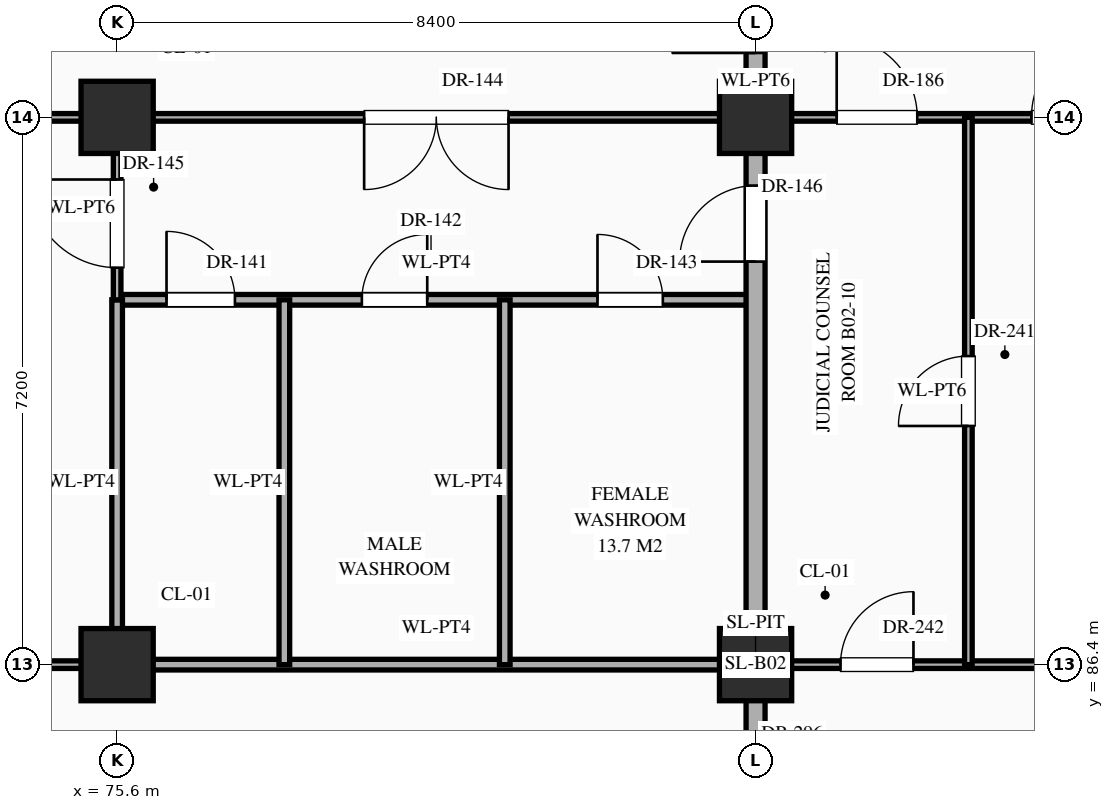
"""IFC4 building model, lengths in metres.
Left out: names, types, materials, properties, quantities, classifications, styles, units other than length and angle.
Written with IfcOpenShell. Run it as: python <this file> out.ifc"""

import sys

from ifc_helpers import new_model, si_unit, direction, frame, frame_2d, origin, origin_2d, place, context, subcontext, project, spatial, rectangle, extrude, element, fill, save


model = new_model("IFC4")
c1 = context("Model", 3, precision=1e-05, world=origin(), true_north=direction((0.0, 1.0)))
c2 = subcontext(c1, "Body", "Model", "MODEL_VIEW")
j1 = project(units=[si_unit("LENGTHUNIT", "METRE"), si_unit("PLANEANGLEUNIT", "RADIAN")], contexts=[c1])
p1 = place(None, origin())
s1 = spatial("IfcSite", under=j1, at=p1, CompositionType="ELEMENT")
p2 = place(p1, origin())
s2 = spatial("IfcBuilding", under=s1, at=p2, CompositionType="ELEMENT")
p3 = place(p2, frame((0.0, 0.0, -10.2)))
s3 = spatial("IfcBuildingStorey", under=s2, at=p3, CompositionType="ELEMENT", Elevation=-10.2)
for number, where, z_axis, x_axis in (
    (1, (75.6, 86.4, 0.0), (0.0, 0.0, 1.0), (1.0, 0.0, 0.0)),
    (2, (75.6, 93.6, 0.0), (0.0, 0.0, 1.0), (1.0, 0.0, 0.0)),
    (3, (84.0, 86.4, 0.0), (0.0, 0.0, 1.0), (1.0, 0.0, 0.0)),
    (4, (84.0, 93.6, 0.0), (0.0, 0.0, 1.0), (1.0, 0.0, 0.0)),
):
    element("IfcColumn", number, at=place(p3, frame(where, z_axis=z_axis, x_axis=x_axis)), inside=s3, PredefinedType="COLUMN", context=c2, shape_type="SweptSolid", body=[
        extrude(rectangle(XDim=0.95, YDim=0.95, at=origin_2d()), origin(), (0.0, 0.0, 1.0), 4.8),
    ])
p4 = place(p3, frame((67.2, 86.4, 0.0), z_axis=(0.0, 0.0, 1.0), x_axis=(1.0, 0.0, 0.0)))
e5 = element("IfcWall", 5, at=p4, inside=s3, PredefinedType="STANDARD", context=c2, shape_type="SweptSolid", body=[
    extrude(rectangle(XDim=8.4, YDim=0.1, at=frame_2d((4.2, 0.0))), origin(), (0.0, 0.0, 1.0), 3.63),
])
p5 = place(p4, frame((3.77, 0.0, 0.0)))
e6 = element("IfcOpeningElement", 6, at=p5, cuts=e5, PredefinedType="OPENING", context=c2, shape_type="SweptSolid", body=[
    extrude(rectangle(XDim=0.86, YDim=2.1, at=frame_2d((0.43, 1.05))), frame((0.0, 0.062, 0.0), z_axis=(0.0, -1.0, 0.0), x_axis=(1.0, 0.0, 0.0)), (0.0, 0.0, 1.0), 0.124),
])
p6 = place(p3, frame((75.6, 86.4, 0.0), z_axis=(0.0, 0.0, 1.0), x_axis=(1.0, 0.0, 0.0)))
e7 = element("IfcWall", 7, at=p6, inside=s3, PredefinedType="STANDARD", context=c2, shape_type="SweptSolid", body=[
    extrude(rectangle(XDim=8.4, YDim=0.14, at=frame_2d((4.2, 0.0))), origin(), (0.0, 0.0, 1.0), 3.63),
])
p7 = place(p3, frame((84.0, 86.4, 0.0), z_axis=(0.0, 0.0, 1.0), x_axis=(1.0, 0.0, 0.0)))
e8 = element("IfcWall", 8, at=p7, inside=s3, PredefinedType="STANDARD", context=c2, shape_type="SweptSolid", body=[
    extrude(rectangle(XDim=16.8, YDim=0.1, at=frame_2d((8.4, 0.0))), origin(), (0.0, 0.0, 1.0), 3.63),
])
p8 = place(p7, frame((1.117, 0.0, 0.0)))
e9 = element("IfcOpeningElement", 9, at=p8, cuts=e8, PredefinedType="OPENING", context=c2, shape_type="SweptSolid", body=[
    extrude(rectangle(XDim=0.96, YDim=2.2, at=frame_2d((0.48, 1.1))), frame((0.0, 0.062, 0.0), z_axis=(0.0, -1.0, 0.0), x_axis=(1.0, 0.0, 0.0)), (0.0, 0.0, 1.0), 0.124),
])
p9 = place(p7, frame((3.68, 0.0, 0.0)))
e10 = element("IfcOpeningElement", 10, at=p9, cuts=e8, PredefinedType="OPENING", context=c2, shape_type="SweptSolid", body=[
    extrude(rectangle(XDim=1.04, YDim=2.2, at=frame_2d((0.52, 1.1))), frame((0.0, 0.062, 0.0), z_axis=(0.0, -1.0, 0.0), x_axis=(1.0, 0.0, 0.0)), (0.0, 0.0, 1.0), 0.124),
])
p10 = place(p7, frame((6.262, 0.0, 0.0)))
e11 = element("IfcOpeningElement", 11, at=p10, cuts=e8, PredefinedType="OPENING", context=c2, shape_type="SweptSolid", body=[
    extrude(rectangle(XDim=1.08, YDim=2.25, at=frame_2d((0.54, 1.125))), frame((0.0, 0.062, 0.0), z_axis=(0.0, -1.0, 0.0), x_axis=(1.0, 0.0, 0.0)), (0.0, 0.0, 1.0), 0.124),
])
p11 = place(p7, frame((12.04, 0.0, 0.0)))
e12 = element("IfcOpeningElement", 12, at=p11, cuts=e8, PredefinedType="OPENING", context=c2, shape_type="SweptSolid", body=[
    extrude(rectangle(XDim=1.12, YDim=2.25, at=frame_2d((0.56, 1.125))), frame((0.0, 0.062, 0.0), z_axis=(0.0, -1.0, 0.0), x_axis=(1.0, 0.0, 0.0)), (0.0, 0.0, 1.0), 0.124),
])
p12 = place(p3, frame((75.6, 91.2, 0.0), z_axis=(0.0, 0.0, 1.0), x_axis=(1.0, 0.0, 0.0)))
e13 = element("IfcWall", 13, at=p12, inside=s3, PredefinedType="STANDARD", context=c2, shape_type="SweptSolid", body=[
    extrude(rectangle(XDim=8.4, YDim=0.14, at=frame_2d((4.2, 0.0))), origin(), (0.0, 0.0, 1.0), 4.48),
])
p13 = place(p12, frame((0.65, 0.0, 0.0)))
e14 = element("IfcOpeningElement", 14, at=p13, cuts=e13, PredefinedType="OPENING", context=c2, shape_type="SweptSolid", body=[
    extrude(rectangle(XDim=0.9, YDim=2.15, at=frame_2d((0.45, 1.075))), frame((0.0, 0.082, 0.0), z_axis=(0.0, -1.0, 0.0), x_axis=(1.0, 0.0, 0.0)), (0.0, 0.0, 1.0), 0.164),
])
p14 = place(p12, frame((3.22, 0.0, 0.0)))
e15 = element("IfcOpeningElement", 15, at=p14, cuts=e13, PredefinedType="OPENING", context=c2, shape_type="SweptSolid", body=[
    extrude(rectangle(XDim=0.86, YDim=2.1, at=frame_2d((0.43, 1.05))), frame((0.0, 0.082, 0.0), z_axis=(0.0, -1.0, 0.0), x_axis=(1.0, 0.0, 0.0)), (0.0, 0.0, 1.0), 0.164),
])
p15 = place(p12, frame((6.32, 0.0, 0.0)))
e16 = element("IfcOpeningElement", 16, at=p15, cuts=e13, PredefinedType="OPENING", context=c2, shape_type="SweptSolid", body=[
    extrude(rectangle(XDim=0.86, YDim=2.1, at=frame_2d((0.43, 1.05))), frame((0.0, 0.082, 0.0), z_axis=(0.0, -1.0, 0.0), x_axis=(1.0, 0.0, 0.0)), (0.0, 0.0, 1.0), 0.164),
])
p16 = place(p3, frame((67.2, 93.6, 0.0), z_axis=(0.0, 0.0, 1.0), x_axis=(1.0, 0.0, 0.0)))
e17 = element("IfcWall", 17, at=p16, inside=s3, PredefinedType="STANDARD", context=c2, shape_type="SweptSolid", body=[
    extrude(rectangle(XDim=33.6, YDim=0.1, at=frame_2d((16.8, 0.0))), origin(), (0.0, 0.0, 1.0), 3.63),
])
p17 = place(p16, frame((11.65, 0.0, 0.0)))
e18 = element("IfcOpeningElement", 18, at=p17, cuts=e17, PredefinedType="OPENING", context=c2, shape_type="SweptSolid", body=[
    extrude(rectangle(XDim=1.9, YDim=2.5, at=frame_2d((0.95, 1.25))), frame((0.0, 0.062, 0.0), z_axis=(0.0, -1.0, 0.0), x_axis=(1.0, 0.0, 0.0)), (0.0, 0.0, 1.0), 0.124),
])
p18 = place(p16, frame((3.68, 0.0, 0.0)))
e19 = element("IfcOpeningElement", 19, at=p18, cuts=e17, PredefinedType="OPENING", context=c2, shape_type="SweptSolid", body=[
    extrude(rectangle(XDim=1.04, YDim=2.2, at=frame_2d((0.52, 1.1))), frame((0.0, 0.062, 0.0), z_axis=(0.0, -1.0, 0.0), x_axis=(1.0, 0.0, 0.0)), (0.0, 0.0, 1.0), 0.124),
])
p19 = place(p16, frame((17.867, 0.0, 0.0)))
e20 = element("IfcOpeningElement", 20, at=p19, cuts=e17, PredefinedType="OPENING", context=c2, shape_type="SweptSolid", body=[
    extrude(rectangle(XDim=1.06, YDim=2.4, at=frame_2d((0.53, 1.2))), frame((0.0, 0.062, 0.0), z_axis=(0.0, -1.0, 0.0), x_axis=(1.0, 0.0, 0.0)), (0.0, 0.0, 1.0), 0.124),
])
p20 = place(p16, frame((20.43, 0.0, 0.0)))
e21 = element("IfcOpeningElement", 21, at=p20, cuts=e17, PredefinedType="OPENING", context=c2, shape_type="SweptSolid", body=[
    extrude(rectangle(XDim=1.14, YDim=2.4, at=frame_2d((0.57, 1.2))), frame((0.0, 0.062, 0.0), z_axis=(0.0, -1.0, 0.0), x_axis=(1.0, 0.0, 0.0)), (0.0, 0.0, 1.0), 0.124),
])
p21 = place(p16, frame((23.153, 0.0, 0.0)))
e22 = element("IfcOpeningElement", 22, at=p21, cuts=e17, PredefinedType="OPENING", context=c2, shape_type="SweptSolid", body=[
    extrude(rectangle(XDim=0.9, YDim=2.15, at=frame_2d((0.45, 1.075))), frame((0.0, 0.062, 0.0), z_axis=(0.0, -1.0, 0.0), x_axis=(1.0, 0.0, 0.0)), (0.0, 0.0, 1.0), 0.124),
])
p22 = place(p16, frame((28.97, 0.0, 0.0)))
e23 = element("IfcOpeningElement", 23, at=p22, cuts=e17, PredefinedType="OPENING", context=c2, shape_type="SweptSolid", body=[
    extrude(rectangle(XDim=0.86, YDim=2.1, at=frame_2d((0.43, 1.05))), frame((0.0, 0.062, 0.0), z_axis=(0.0, -1.0, 0.0), x_axis=(1.0, 0.0, 0.0)), (0.0, 0.0, 1.0), 0.124),
])
p23 = place(p3, frame((75.6, 86.4, 0.0), z_axis=(0.0, 0.0, 1.0), x_axis=(0.0, 1.0, 0.0)))
e24 = element("IfcWall", 24, at=p23, inside=s3, PredefinedType="STANDARD", context=c2, shape_type="SweptSolid", body=[
    extrude(rectangle(XDim=4.8, YDim=0.14, at=frame_2d((2.4, 0.0))), origin(), (0.0, 0.0, 1.0), 3.73),
])
p24 = place(p3, frame((75.6, 91.2, 0.0), z_axis=(0.0, 0.0, 1.0), x_axis=(0.0, 1.0, 0.0)))
e25 = element("IfcWall", 25, at=p24, inside=s3, PredefinedType="STANDARD", context=c2, shape_type="SweptSolid", body=[
    extrude(rectangle(XDim=2.4, YDim=0.1, at=frame_2d((1.2, 0.0))), origin(), (0.0, 0.0, 1.0), 3.73),
])
p25 = place(p24, frame((0.423, 0.0, 0.0)))
e26 = element("IfcOpeningElement", 26, at=p25, cuts=e25, PredefinedType="OPENING", context=c2, shape_type="SweptSolid", body=[
    extrude(rectangle(XDim=1.16, YDim=2.3, at=frame_2d((0.58, 1.15))), frame((0.0, 0.062, 0.0), z_axis=(0.0, -1.0, 0.0), x_axis=(1.0, 0.0, 0.0)), (0.0, 0.0, 1.0), 0.124),
])
for number, where, z_axis, x_axis in (
    (27, (77.8, 86.4, 0.0), (0.0, 0.0, 1.0), (0.0, 1.0, 0.0)),
    (28, (80.7, 86.4, 0.0), (0.0, 0.0, 1.0), (0.0, 1.0, 0.0)),
):
    element("IfcWall", number, at=place(p3, frame(where, z_axis=z_axis, x_axis=x_axis)), inside=s3, PredefinedType="STANDARD", context=c2, shape_type="SweptSolid", body=[
        extrude(rectangle(XDim=4.8, YDim=0.14, at=frame_2d((2.4, 0.0))), origin(), (0.0, 0.0, 1.0), 4.48),
    ])
p26 = place(p3, frame((84.0, 79.2, 0.0), z_axis=(0.0, 0.0, 1.0), x_axis=(0.0, 1.0, 0.0)))
e29 = element("IfcWall", 29, at=p26, inside=s3, PredefinedType="STANDARD", context=c2, shape_type="SweptSolid", body=[
    extrude(rectangle(XDim=35.96, YDim=0.25, at=frame_2d((17.98, 0.0))), origin(), (0.0, 0.0, 1.0), 3.73),
])
p27 = place(p26, frame((22.448, 0.0, 0.0)))
e30 = element("IfcOpeningElement", 30, at=p27, cuts=e29, PredefinedType="OPENING", context=c2, shape_type="SweptSolid", body=[
    extrude(rectangle(XDim=1.1, YDim=2.2, at=frame_2d((0.55, 1.1))), frame((0.0, 0.137, 0.0), z_axis=(0.0, -1.0, 0.0), x_axis=(1.0, 0.0, 0.0)), (0.0, 0.0, 1.0), 0.274),
])
p28 = place(p26, frame((12.502, 0.0, 0.0)))
e31 = element("IfcOpeningElement", 31, at=p28, cuts=e29, PredefinedType="OPENING", context=c2, shape_type="SweptSolid", body=[
    extrude(rectangle(XDim=1.0, YDim=2.2, at=frame_2d((0.5, 1.1))), frame((0.0, 0.137, 0.0), z_axis=(0.0, -1.0, 0.0), x_axis=(1.0, 0.0, 0.0)), (0.0, 0.0, 1.0), 0.274),
])
p29 = place(p26, frame((15.248, 0.0, 0.0)))
e32 = element("IfcOpeningElement", 32, at=p29, cuts=e29, PredefinedType="OPENING", context=c2, shape_type="SweptSolid", body=[
    extrude(rectangle(XDim=1.1, YDim=2.2, at=frame_2d((0.55, 1.1))), frame((0.0, 0.137, 0.0), z_axis=(0.0, -1.0, 0.0), x_axis=(1.0, 0.0, 0.0)), (0.0, 0.0, 1.0), 0.274),
])
p30 = place(p26, frame((29.722, 0.0, 0.0)))
e33 = element("IfcOpeningElement", 33, at=p30, cuts=e29, PredefinedType="OPENING", context=c2, shape_type="SweptSolid", body=[
    extrude(rectangle(XDim=0.95, YDim=2.15, at=frame_2d((0.475, 1.075))), frame((0.0, 0.137, 0.0), z_axis=(0.0, -1.0, 0.0), x_axis=(1.0, 0.0, 0.0)), (0.0, 0.0, 1.0), 0.274),
])
p31 = place(p26, frame((5.302, 0.0, 0.0)))
e34 = element("IfcOpeningElement", 34, at=p31, cuts=e29, PredefinedType="OPENING", context=c2, shape_type="SweptSolid", body=[
    extrude(rectangle(XDim=1.0, YDim=2.2, at=frame_2d((0.5, 1.1))), frame((0.0, 0.137, 0.0), z_axis=(0.0, -1.0, 0.0), x_axis=(1.0, 0.0, 0.0)), (0.0, 0.0, 1.0), 0.274),
])
p32 = place(p3, frame((86.8, 86.4, 0.0), z_axis=(0.0, 0.0, 1.0), x_axis=(0.0, 1.0, 0.0)))
e35 = element("IfcWall", 35, at=p32, inside=s3, PredefinedType="STANDARD", context=c2, shape_type="SweptSolid", body=[
    extrude(rectangle(XDim=7.2, YDim=0.1, at=frame_2d((3.6, 0.0))), origin(), (0.0, 0.0, 1.0), 4.48),
])
p33 = place(p32, frame((3.14, 0.0, 0.0)))
e36 = element("IfcOpeningElement", 36, at=p33, cuts=e35, PredefinedType="OPENING", context=c2, shape_type="SweptSolid", body=[
    extrude(rectangle(XDim=0.92, YDim=2.15, at=frame_2d((0.46, 1.075))), frame((0.0, 0.062, 0.0), z_axis=(0.0, -1.0, 0.0), x_axis=(1.0, 0.0, 0.0)), (0.0, 0.0, 1.0), 0.124),
])
p34 = place(p13, origin())
e37 = element("IfcDoor", 37, at=p34, inside=s3, OperationType="SINGLE_SWING_LEFT", PredefinedType="DOOR", context=c2, shape_type="SweptSolid", body=[
    extrude(rectangle(XDim=0.9, YDim=2.15, at=frame_2d((0.45, 1.075))), frame((0.0, 0.025, 0.0), z_axis=(0.0, -1.0, 0.0), x_axis=(1.0, 0.0, 0.0)), (0.0, 0.0, 1.0), 0.05),
])
fill(e14, e37)
p35 = place(p14, origin())
e38 = element("IfcDoor", 38, at=p35, inside=s3, OperationType="SINGLE_SWING_RIGHT", PredefinedType="DOOR", context=c2, shape_type="SweptSolid", body=[
    extrude(rectangle(XDim=0.86, YDim=2.1, at=frame_2d((0.43, 1.05))), frame((0.0, 0.025, 0.0), z_axis=(0.0, -1.0, 0.0), x_axis=(1.0, 0.0, 0.0)), (0.0, 0.0, 1.0), 0.05),
])
fill(e15, e38)
p36 = place(p15, origin())
e39 = element("IfcDoor", 39, at=p36, inside=s3, OperationType="SINGLE_SWING_LEFT", PredefinedType="DOOR", context=c2, shape_type="SweptSolid", body=[
    extrude(rectangle(XDim=0.86, YDim=2.1, at=frame_2d((0.43, 1.05))), frame((0.0, 0.025, 0.0), z_axis=(0.0, -1.0, 0.0), x_axis=(1.0, 0.0, 0.0)), (0.0, 0.0, 1.0), 0.05),
])
fill(e16, e39)
p37 = place(p17, frame((1.9, 0.0, 0.0), z_axis=(0.0, 0.0, 1.0), x_axis=(-1.0, 0.0, 0.0)))
e40 = element("IfcDoor", 40, at=p37, inside=s3, OperationType="DOUBLE_DOOR_SINGLE_SWING", PredefinedType="DOOR", context=c2, shape_type="SweptSolid", body=[
    extrude(rectangle(XDim=1.9, YDim=2.5, at=frame_2d((0.95, 1.25))), frame((0.0, 0.025, 0.0), z_axis=(0.0, -1.0, 0.0), x_axis=(1.0, 0.0, 0.0)), (0.0, 0.0, 1.0), 0.05),
])
fill(e18, e40)
p38 = place(p25, origin())
e41 = element("IfcDoor", 41, at=p38, inside=s3, OperationType="SINGLE_SWING_RIGHT", PredefinedType="DOOR", context=c2, shape_type="SweptSolid", body=[
    extrude(rectangle(XDim=1.16, YDim=2.3, at=frame_2d((0.58, 1.15))), frame((0.0, 0.025, 0.0), z_axis=(0.0, -1.0, 0.0), x_axis=(1.0, 0.0, 0.0)), (0.0, 0.0, 1.0), 0.05),
])
fill(e26, e41)
p39 = place(p28, origin())
e42 = element("IfcDoor", 42, at=p39, inside=s3, OperationType="SINGLE_SWING_LEFT", PredefinedType="DOOR", context=c2, shape_type="SweptSolid", body=[
    extrude(rectangle(XDim=1.0, YDim=2.2, at=frame_2d((0.5, 1.1))), frame((0.0, 0.025, 0.0), z_axis=(0.0, -1.0, 0.0), x_axis=(1.0, 0.0, 0.0)), (0.0, 0.0, 1.0), 0.05),
])
fill(e31, e42)
p40 = place(p29, origin())
e43 = element("IfcDoor", 43, at=p40, inside=s3, OperationType="SINGLE_SWING_LEFT", PredefinedType="DOOR", context=c2, shape_type="SweptSolid", body=[
    extrude(rectangle(XDim=1.1, YDim=2.2, at=frame_2d((0.55, 1.1))), frame((0.0, 0.025, 0.0), z_axis=(0.0, -1.0, 0.0), x_axis=(1.0, 0.0, 0.0)), (0.0, 0.0, 1.0), 0.05),
])
fill(e32, e43)
p41 = place(p19, origin())
e44 = element("IfcDoor", 44, at=p41, inside=s3, OperationType="SINGLE_SWING_LEFT", PredefinedType="DOOR", context=c2, shape_type="SweptSolid", body=[
    extrude(rectangle(XDim=1.06, YDim=2.4, at=frame_2d((0.53, 1.2))), frame((0.0, 0.025, 0.0), z_axis=(0.0, -1.0, 0.0), x_axis=(1.0, 0.0, 0.0)), (0.0, 0.0, 1.0), 0.05),
])
fill(e20, e44)
p42 = place(p20, origin())
e45 = element("IfcDoor", 45, at=p42, inside=s3, OperationType="SINGLE_SWING_RIGHT", PredefinedType="DOOR", context=c2, shape_type="SweptSolid", body=[
    extrude(rectangle(XDim=1.14, YDim=2.4, at=frame_2d((0.57, 1.2))), frame((0.0, 0.025, 0.0), z_axis=(0.0, -1.0, 0.0), x_axis=(1.0, 0.0, 0.0)), (0.0, 0.0, 1.0), 0.05),
])
fill(e21, e45)
p43 = place(p33, origin())
e46 = element("IfcDoor", 46, at=p43, inside=s3, OperationType="SINGLE_SWING_LEFT", PredefinedType="DOOR", context=c2, shape_type="SweptSolid", body=[
    extrude(rectangle(XDim=0.92, YDim=2.15, at=frame_2d((0.46, 1.075))), frame((0.0, 0.025, 0.0), z_axis=(0.0, -1.0, 0.0), x_axis=(1.0, 0.0, 0.0)), (0.0, 0.0, 1.0), 0.05),
])
fill(e36, e46)
p44 = place(p8, origin())
e47 = element("IfcDoor", 47, at=p44, inside=s3, OperationType="SINGLE_SWING_RIGHT", PredefinedType="DOOR", context=c2, shape_type="SweptSolid", body=[
    extrude(rectangle(XDim=0.96, YDim=2.2, at=frame_2d((0.48, 1.1))), frame((0.0, 0.025, 0.0), z_axis=(0.0, -1.0, 0.0), x_axis=(1.0, 0.0, 0.0)), (0.0, 0.0, 1.0), 0.05),
])
fill(e9, e47)
save(model, sys.argv[1])
